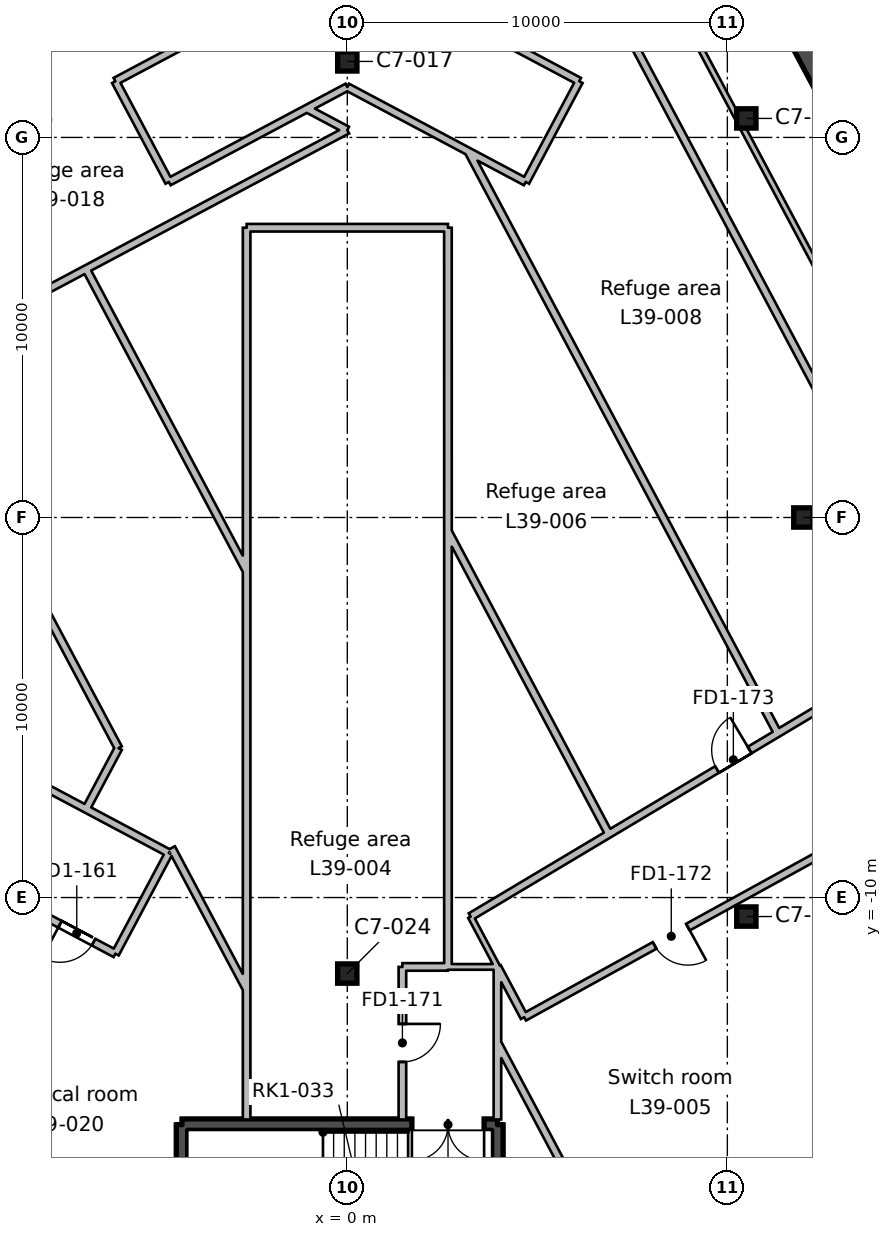
"""IFC4 building model, lengths in metres.
Left out: names, types, materials, properties, quantities, classifications, styles, units other than length and angle.
Written with IfcOpenShell. Run it as: python <this file> out.ifc"""

import sys

from ifc_helpers import new_model, si_unit, direction, frame, frame_2d, origin, origin_2d, place, context, subcontext, project, spatial, rectangle, hollow_rectangle, extrude, element, fill, save


model = new_model("IFC4")
c1 = context("Model", 3, precision=1e-05, world=origin(), true_north=direction((0.0, 1.0)))
c2 = subcontext(c1, "Body", "Model", "MODEL_VIEW")
j1 = project(units=[si_unit("LENGTHUNIT", "METRE"), si_unit("PLANEANGLEUNIT", "RADIAN")], contexts=[c1])
p1 = place(None, origin())
s1 = spatial("IfcSite", under=j1, at=p1, CompositionType="ELEMENT")
p2 = place(p1, origin())
s2 = spatial("IfcBuilding", under=s1, at=p2, CompositionType="ELEMENT")
p3 = place(p2, frame((0.0, 0.0, 183.6)))
s3 = spatial("IfcBuildingStorey", under=s2, at=p3, CompositionType="ELEMENT", Elevation=183.6)
for number, where, z_axis, x_axis in (
    (1, (0.0, -12.0, 0.0), (0.0, 0.0, 1.0), (1.0, 0.0, 0.0)),
    (2, (10.5, -10.5, 0.0), (0.0, 0.0, 1.0), (1.0, 0.0, 0.0)),
    (3, (12.0, 0.0, 0.0), (0.0, 0.0, 1.0), (1.0, 0.0, 0.0)),
    (4, (10.5, 10.5, 0.0), (0.0, 0.0, 1.0), (1.0, 0.0, 0.0)),
    (5, (0.0, 12.0, 0.0), (0.0, 0.0, 1.0), (1.0, 0.0, 0.0)),
):
    element("IfcColumn", number, at=place(p3, frame(where, z_axis=z_axis, x_axis=x_axis)), inside=s3, PredefinedType="COLUMN", context=c2, shape_type="SweptSolid", body=[
        extrude(hollow_rectangle(XDim=0.508, YDim=0.508, WallThickness=0.012, InnerFilletRadius=0.006, OuterFilletRadius=0.018, at=origin_2d()), origin(), (0.0, 0.0, 1.0), 6.0),
    ])
p4 = place(p3, frame((19.215, -0.939, 0.0), z_axis=(0.0, 0.0, 1.0), x_axis=(-0.469479580143, 0.882943329908, 0.0)))
e6 = element("IfcWall", 6, at=p4, inside=s3, PredefinedType="SHEAR", context=c2, shape_type="SweptSolid", body=[
    extrude(rectangle(XDim=19.7, YDim=0.75, at=frame_2d((9.85, 0.0))), origin(), (0.0, 0.0, 1.0), 6.0),
])
p5 = place(p4, frame((6.85, 0.0, 0.0)))
e7 = element("IfcOpeningElement", 7, at=p5, cuts=e6, PredefinedType="OPENING", context=c2, shape_type="SweptSolid", body=[
    extrude(rectangle(XDim=2.4, YDim=2.4, at=frame_2d((1.2, 1.2))), frame((0.0, 0.385, 0.0), z_axis=(0.0, -1.0, 0.0), x_axis=(1.0, 0.0, 0.0)), (0.0, 0.0, 1.0), 0.77),
])
for number, where, z_axis, x_axis in (
    (8, (3.95, -15.975, 0.0), (0.0, 0.0, 1.0), (0.0, -1.0, 0.0)),
    (9, (-4.35, -20.825, 0.0), (0.0, 0.0, 1.0), (0.0, 1.0, 0.0)),
):
    element("IfcWall", number, at=place(p3, frame(where, z_axis=z_axis, x_axis=x_axis)), inside=s3, PredefinedType="SHEAR", context=c2, shape_type="SweptSolid", body=[
        extrude(rectangle(XDim=4.85, YDim=0.3, at=frame_2d((2.425, 0.0))), origin(), (0.0, 0.0, 1.0), 6.0),
    ])
p6 = place(p3, frame((-4.35, -15.975, 0.0), z_axis=(0.0, 0.0, 1.0), x_axis=(1.0, 0.0, 0.0)))
e10 = element("IfcWall", 10, at=p6, inside=s3, PredefinedType="SHEAR", context=c2, shape_type="SweptSolid", body=[
    extrude(rectangle(XDim=8.3, YDim=0.3, at=frame_2d((4.15, 0.0))), origin(), (0.0, 0.0, 1.0), 6.0),
])
p7 = place(p6, frame((6.05, 0.0, 0.0)))
e11 = element("IfcOpeningElement", 11, at=p7, cuts=e10, PredefinedType="OPENING", context=c2, shape_type="SweptSolid", body=[
    extrude(rectangle(XDim=1.9, YDim=2.1, at=frame_2d((0.95, 1.05))), frame((0.0, 0.16, 0.0), z_axis=(0.0, -1.0, 0.0), x_axis=(1.0, 0.0, 0.0)), (0.0, 0.0, 1.0), 0.32),
])
p8 = place(p3, frame((-15.353, -0.97, 0.0), z_axis=(0.0, 0.0, 1.0), x_axis=(0.469461347352, 0.882953024426, 0.0)))
e12 = element("IfcWall", 12, at=p8, inside=s3, PredefinedType="PARTITIONING", context=c2, shape_type="SweptSolid", body=[
    extrude(rectangle(XDim=17.064, YDim=0.2, at=frame_2d((8.532, 0.0))), origin(), (0.0, 0.0, 1.0), 5.55),
])
p9 = place(p3, frame((-6.873, 6.538, 0.0), z_axis=(0.0, 0.0, 1.0), x_axis=(-0.882996997183, -0.469378634969, 0.0)))
e13 = element("IfcWall", 13, at=p9, inside=s3, PredefinedType="PARTITIONING", context=c2, shape_type="SweptSolid", body=[
    extrude(rectangle(XDim=5.167, YDim=0.2, at=frame_2d((2.583, 0.0))), origin(), (0.0, 0.0, 1.0), 5.55),
])
p10 = place(p3, frame((-11.435, 4.113, 0.0), z_axis=(0.0, 0.0, 1.0), x_axis=(0.469480251476, -0.882942972946, 0.0)))
e14 = element("IfcWall", 14, at=p10, inside=s3, PredefinedType="PARTITIONING", context=c2, shape_type="SweptSolid", body=[
    extrude(rectangle(XDim=11.532, YDim=0.2, at=frame_2d((5.766, 0.0))), origin(), (0.0, 0.0, 1.0), 5.55),
])
p11 = place(p3, frame((-6.021, -6.069, 0.0), z_axis=(0.0, 0.0, 1.0), x_axis=(-0.469624131111, -0.882866453932, 0.0)))
e15 = element("IfcWall", 15, at=p11, inside=s3, PredefinedType="PARTITIONING", context=c2, shape_type="SweptSolid", body=[
    extrude(rectangle(XDim=1.814, YDim=0.2, at=frame_2d((0.907, 0.0))), origin(), (0.0, 0.0, 1.0), 5.55),
])
p12 = place(p3, frame((-4.695, -8.829, 0.0), z_axis=(0.0, 0.0, 1.0), x_axis=(-0.469341661158, -0.883016650523, 0.0)))
e16 = element("IfcWall", 16, at=p12, inside=s3, PredefinedType="PARTITIONING", context=c2, shape_type="SweptSolid", body=[
    extrude(rectangle(XDim=3.0, YDim=0.2, at=frame_2d((1.5, 0.0))), origin(), (0.0, 0.0, 1.0), 5.55),
])
p13 = place(p3, frame((-6.103, -11.478, 0.0), z_axis=(0.0, 0.0, 1.0), x_axis=(-0.882995347911, 0.469381737574, 0.0)))
e17 = element("IfcWall", 17, at=p13, inside=s3, PredefinedType="PARTITIONING", context=c2, shape_type="SweptSolid", body=[
    extrude(rectangle(XDim=2.312, YDim=0.2, at=frame_2d((1.156, 0.0))), origin(), (0.0, 0.0, 1.0), 5.55),
])
p14 = place(p13, frame((0.65, 0.0, 0.0)))
e18 = element("IfcOpeningElement", 18, at=p14, cuts=e17, PredefinedType="OPENING", context=c2, shape_type="SweptSolid", body=[
    extrude(rectangle(XDim=1.0, YDim=2.1, at=frame_2d((0.5, 1.05))), frame((0.0, 0.11, 0.0), z_axis=(0.0, -1.0, 0.0), x_axis=(1.0, 0.0, 0.0)), (0.0, 0.0, 1.0), 0.22),
])
p15 = place(p3, frame((-1.063, 10.758, 0.0), z_axis=(0.0, 0.0, 1.0), x_axis=(0.883036930651, -0.469303504255, 0.0)))
e19 = element("IfcWall", 19, at=p15, inside=s3, PredefinedType="PARTITIONING", context=c2, shape_type="SweptSolid", body=[
    extrude(rectangle(XDim=1.204, YDim=0.2, at=frame_2d((0.602, 0.0))), origin(), (0.0, 0.0, 1.0), 5.55),
])
p16 = place(p3, frame((0.0, 10.193, 0.0), z_axis=(0.0, 0.0, 1.0), x_axis=(-0.882917481192, -0.469528190215, 0.0)))
e20 = element("IfcWall", 20, at=p16, inside=s3, PredefinedType="PARTITIONING", context=c2, shape_type="SweptSolid", body=[
    extrude(rectangle(XDim=7.784, YDim=0.2, at=frame_2d((3.892, 0.0))), origin(), (0.0, 0.0, 1.0), 5.55),
])
p17 = place(p3, frame((-2.649, -1.407, 0.0), z_axis=(0.0, 0.0, 1.0), x_axis=(-0.469441525693, 0.882963563209, 0.0)))
e21 = element("IfcWall", 21, at=p17, inside=s3, PredefinedType="PARTITIONING", context=c2, shape_type="SweptSolid", body=[
    extrude(rectangle(XDim=8.998, YDim=0.2, at=frame_2d((4.499, 0.0))), origin(), (0.0, 0.0, 1.0), 5.55),
])
p18 = place(p3, frame((-4.624, -8.697, 0.0), z_axis=(0.0, 0.0, 1.0), x_axis=(0.469425311491, -0.882972183555, 0.0)))
e22 = element("IfcWall", 22, at=p18, inside=s3, PredefinedType="PARTITIONING", context=c2, shape_type="SweptSolid", body=[
    extrude(rectangle(XDim=4.208, YDim=0.2, at=frame_2d((2.104, 0.0))), origin(), (0.0, 0.0, 1.0), 5.55),
])
p19 = place(p3, frame((-20.588, -0.379, 0.0), z_axis=(0.0, 0.0, 1.0), x_axis=(0.882951465933, -0.469464278521, 0.0)))
e23 = element("IfcWall", 23, at=p19, inside=s3, PredefinedType="PARTITIONING", context=c2, shape_type="SweptSolid", body=[
    extrude(rectangle(XDim=18.0, YDim=0.2, at=frame_2d((9.0, 0.0))), origin(), (0.0, 0.0, 1.0), 5.55),
])
p20 = place(p19, frame((8.45, 0.0, 0.0)))
e24 = element("IfcOpeningElement", 24, at=p20, cuts=e23, PredefinedType="OPENING", context=c2, shape_type="SweptSolid", body=[
    extrude(rectangle(XDim=1.0, YDim=2.1, at=frame_2d((0.5, 1.05))), frame((0.0, 0.11, 0.0), z_axis=(0.0, -1.0, 0.0), x_axis=(1.0, 0.0, 0.0)), (0.0, 0.0, 1.0), 0.22),
])
p21 = place(p3, frame((-1.075, 10.754, 0.0), z_axis=(0.0, 0.0, 1.0), x_axis=(-0.88295221972, -0.469462860822, 0.0)))
e25 = element("IfcWall", 25, at=p21, inside=s3, PredefinedType="PARTITIONING", context=c2, shape_type="SweptSolid", body=[
    extrude(rectangle(XDim=4.1, YDim=0.2, at=frame_2d((2.05, 0.0))), origin(), (0.0, 0.0, 1.0), 5.55),
])
p22 = place(p3, frame((-4.695, 8.829, 0.0), z_axis=(0.0, 0.0, 1.0), x_axis=(-0.469341661158, 0.883016650523, 0.0)))
e26 = element("IfcWall", 26, at=p22, inside=s3, PredefinedType="PARTITIONING", context=c2, shape_type="SweptSolid", body=[
    extrude(rectangle(XDim=3.0, YDim=0.2, at=frame_2d((1.5, 0.0))), origin(), (0.0, 0.0, 1.0), 5.55),
])
p23 = place(p3, frame((-6.103, 11.478, 0.0), z_axis=(0.0, 0.0, 1.0), x_axis=(0.882813423711, 0.469723811314, 0.0)))
e27 = element("IfcWall", 27, at=p23, inside=s3, PredefinedType="PARTITIONING", context=c2, shape_type="SweptSolid", body=[
    extrude(rectangle(XDim=2.082, YDim=0.2, at=frame_2d((1.041, 0.0))), origin(), (0.0, 0.0, 1.0), 5.55),
])
p24 = place(p3, frame((2.649, -0.297, 0.0), z_axis=(0.0, 0.0, 1.0), x_axis=(-0.000123285559, 0.9999999924, 0.0)))
e28 = element("IfcWall", 28, at=p24, inside=s3, PredefinedType="PARTITIONING", context=c2, shape_type="SweptSolid", body=[
    extrude(rectangle(XDim=7.921, YDim=0.2, at=frame_2d((3.96, 0.0))), origin(), (0.0, 0.0, 1.0), 5.55),
])
p25 = place(p3, frame((-2.649, 7.624, 0.0), z_axis=(0.0, 0.0, 1.0), x_axis=(0.0, -1.0, 0.0)))
e29 = element("IfcWall", 29, at=p25, inside=s3, PredefinedType="PARTITIONING", context=c2, shape_type="SweptSolid", body=[
    extrude(rectangle(XDim=8.921, YDim=0.2, at=frame_2d((4.46, 0.0))), origin(), (0.0, 0.0, 1.0), 5.55),
])
p26 = place(p3, frame((-2.649, 7.624, 0.0), z_axis=(0.0, 0.0, 1.0), x_axis=(1.0, 0.0, 0.0)))
e30 = element("IfcWall", 30, at=p26, inside=s3, PredefinedType="PARTITIONING", context=c2, shape_type="SweptSolid", body=[
    extrude(rectangle(XDim=5.298, YDim=0.2, at=frame_2d((2.649, 0.0))), origin(), (0.0, 0.0, 1.0), 5.55),
])
p27 = place(p3, frame((-2.649, -15.84, 0.0), z_axis=(0.0, 0.0, 1.0), x_axis=(0.0, 1.0, 0.0)))
e31 = element("IfcWall", 31, at=p27, inside=s3, PredefinedType="PARTITIONING", context=c2, shape_type="SweptSolid", body=[
    extrude(rectangle(XDim=14.543, YDim=0.2, at=frame_2d((7.271, 0.0))), origin(), (0.0, 0.0, 1.0), 5.55),
])
p28 = place(p3, frame((3.186, 9.632, 0.0), z_axis=(0.0, 0.0, 1.0), x_axis=(-0.882970255793, 0.469428937524, 0.0)))
e32 = element("IfcWall", 32, at=p28, inside=s3, PredefinedType="PARTITIONING", context=c2, shape_type="SweptSolid", body=[
    extrude(rectangle(XDim=3.608, YDim=0.2, at=frame_2d((1.804, 0.0))), origin(), (0.0, 0.0, 1.0), 5.55),
])
p29 = place(p3, frame((0.0, 11.326, 0.0), z_axis=(0.0, 0.0, 1.0), x_axis=(-0.882791016648, -0.469765921418, 0.0)))
e33 = element("IfcWall", 33, at=p29, inside=s3, PredefinedType="PARTITIONING", context=c2, shape_type="SweptSolid", body=[
    extrude(rectangle(XDim=1.218, YDim=0.2, at=frame_2d((0.609, 0.0))), origin(), (0.0, 0.0, 1.0), 5.55),
])
p30 = place(p3, frame((3.184, 9.632, 0.0), z_axis=(0.0, 0.0, 1.0), x_axis=(0.469488044355, -0.882938829256, 0.0)))
e34 = element("IfcWall", 34, at=p30, inside=s3, PredefinedType="PARTITIONING", context=c2, shape_type="SweptSolid", body=[
    extrude(rectangle(XDim=17.34, YDim=0.2, at=frame_2d((8.67, 0.0))), origin(), (0.0, 0.0, 1.0), 5.55),
])
p31 = place(p3, frame((6.883, -8.329, 0.0), z_axis=(0.0, 0.0, 1.0), x_axis=(-0.469431608927, 0.882968835543, 0.0)))
e35 = element("IfcWall", 35, at=p31, inside=s3, PredefinedType="PARTITIONING", context=c2, shape_type="SweptSolid", body=[
    extrude(rectangle(XDim=9.02, YDim=0.2, at=frame_2d((4.51, 0.0))), origin(), (0.0, 0.0, 1.0), 5.55),
])
p32 = place(p3, frame((1.45, -15.84, 0.0), z_axis=(0.0, 0.0, 1.0), x_axis=(0.0, 1.0, 0.0)))
e36 = element("IfcWall", 36, at=p32, inside=s3, PredefinedType="PARTITIONING", context=c2, shape_type="SweptSolid", body=[
    extrude(rectangle(XDim=4.015, YDim=0.2, at=frame_2d((2.008, 0.0))), origin(), (0.0, 0.0, 1.0), 5.55),
])
p33 = place(p32, frame((1.515, 0.0, 0.0)))
e37 = element("IfcOpeningElement", 37, at=p33, cuts=e36, PredefinedType="OPENING", context=c2, shape_type="SweptSolid", body=[
    extrude(rectangle(XDim=1.0, YDim=2.1, at=frame_2d((0.5, 1.05))), frame((0.0, 0.11, 0.0), z_axis=(0.0, -1.0, 0.0), x_axis=(1.0, 0.0, 0.0)), (0.0, 0.0, 1.0), 0.22),
])
p34 = place(p3, frame((2.647, -11.825, 0.0), z_axis=(0.0, 0.0, 1.0), x_axis=(-0.999999667213, -0.000815826773, 0.0)))
e38 = element("IfcWall", 38, at=p34, inside=s3, PredefinedType="PARTITIONING", context=c2, shape_type="SweptSolid", body=[
    extrude(rectangle(XDim=1.197, YDim=0.2, at=frame_2d((0.599, 0.0))), origin(), (0.0, 0.0, 1.0), 5.55),
])
p35 = place(p3, frame((2.647, -11.825, 0.0), z_axis=(0.0, 0.0, 1.0), x_axis=(1.0, 0.0, 0.0)))
e39 = element("IfcWall", 39, at=p35, inside=s3, PredefinedType="PARTITIONING", context=c2, shape_type="SweptSolid", body=[
    extrude(rectangle(XDim=1.303, YDim=0.15, at=frame_2d((0.651, 0.0))), origin(), (0.0, 0.0, 1.0), 5.55),
])
p36 = place(p3, frame((3.95, -11.825, 0.0), z_axis=(0.0, 0.0, 1.0), x_axis=(0.0, -1.0, 0.0)))
e40 = element("IfcWall", 40, at=p36, inside=s3, PredefinedType="PARTITIONING", context=c2, shape_type="SweptSolid", body=[
    extrude(rectangle(XDim=4.015, YDim=0.2, at=frame_2d((2.008, 0.0))), origin(), (0.0, 0.0, 1.0), 5.55),
])
p37 = place(p3, frame((2.649, -0.297, 0.0), z_axis=(0.0, 0.0, 1.0), x_axis=(0.0, -1.0, 0.0)))
e41 = element("IfcWall", 41, at=p37, inside=s3, PredefinedType="PARTITIONING", context=c2, shape_type="SweptSolid", body=[
    extrude(rectangle(XDim=11.528, YDim=0.2, at=frame_2d((5.764, 0.0))), origin(), (0.0, 0.0, 1.0), 5.55),
])
p38 = place(p3, frame((6.812, 13.814, 0.0), z_axis=(0.0, 0.0, 1.0), x_axis=(0.46951956429, -0.882922068333, 0.0)))
e42 = element("IfcWall", 42, at=p38, inside=s3, PredefinedType="PARTITIONING", context=c2, shape_type="SweptSolid", body=[
    extrude(rectangle(XDim=19.073, YDim=0.2, at=frame_2d((9.536, 0.0))), origin(), (0.0, 0.0, 1.0), 5.55),
])
p39 = place(p3, frame((3.206, 13.019, 0.0), z_axis=(0.0, 0.0, 1.0), x_axis=(0.882863200263, -0.469630247772, 0.0)))
e43 = element("IfcWall", 43, at=p39, inside=s3, PredefinedType="PARTITIONING", context=c2, shape_type="SweptSolid", body=[
    extrude(rectangle(XDim=3.281, YDim=0.2, at=frame_2d((1.641, 0.0))), origin(), (0.0, 0.0, 1.0), 5.55),
])
p40 = place(p3, frame((6.103, 11.478, 0.0), z_axis=(0.0, 0.0, 1.0), x_axis=(-0.469341661158, -0.883016650523, 0.0)))
e44 = element("IfcWall", 44, at=p40, inside=s3, PredefinedType="PARTITIONING", context=c2, shape_type="SweptSolid", body=[
    extrude(rectangle(XDim=3.0, YDim=0.2, at=frame_2d((1.5, 0.0))), origin(), (0.0, 0.0, 1.0), 5.55),
])
p41 = place(p3, frame((4.695, 8.829, 0.0), z_axis=(0.0, 0.0, 1.0), x_axis=(-0.882799303078, 0.469750349106, 0.0)))
e45 = element("IfcWall", 45, at=p41, inside=s3, PredefinedType="PARTITIONING", context=c2, shape_type="SweptSolid", body=[
    extrude(rectangle(XDim=1.709, YDim=0.2, at=frame_2d((0.855, 0.0))), origin(), (0.0, 0.0, 1.0), 5.55),
])
p42 = place(p3, frame((3.951, -11.827, 0.0), z_axis=(0.0, 0.0, 1.0), x_axis=(-0.469381070395, 0.882995702569, 0.0)))
e46 = element("IfcWall", 46, at=p42, inside=s3, PredefinedType="PARTITIONING", context=c2, shape_type="SweptSolid", body=[
    extrude(rectangle(XDim=1.502, YDim=0.15, at=frame_2d((0.751, 0.0))), origin(), (0.0, 0.0, 1.0), 5.55),
])
p43 = place(p3, frame((3.246, -10.501, 0.0), z_axis=(0.0, 0.0, 1.0), x_axis=(0.858642651925, 0.512574673872, 0.0)))
e47 = element("IfcWall", 47, at=p43, inside=s3, PredefinedType="PARTITIONING", context=c2, shape_type="SweptSolid", body=[
    extrude(rectangle(XDim=16.083, YDim=0.2, at=frame_2d((8.042, 0.0))), origin(), (0.0, 0.0, 1.0), 5.55),
])
p44 = place(p43, frame((7.55, 0.0, 0.0)))
e48 = element("IfcOpeningElement", 48, at=p44, cuts=e47, PredefinedType="OPENING", context=c2, shape_type="SweptSolid", body=[
    extrude(rectangle(XDim=1.0, YDim=2.1, at=frame_2d((0.5, 1.05))), frame((0.0, 0.11, 0.0), z_axis=(0.0, -1.0, 0.0), x_axis=(1.0, 0.0, 0.0)), (0.0, 0.0, 1.0), 0.22),
])
p45 = place(p3, frame((17.056, -2.257, 0.0), z_axis=(0.0, 0.0, 1.0), x_axis=(-0.469446756585, 0.882960782103, 0.0)))
e49 = element("IfcWall", 49, at=p45, inside=s3, PredefinedType="PARTITIONING", context=c2, shape_type="SweptSolid", body=[
    extrude(rectangle(XDim=20.0, YDim=0.15, at=frame_2d((10.0, 0.0))), origin(), (0.0, 0.0, 1.0), 5.55),
])
p46 = place(p3, frame((7.304, -20.127, 0.0), z_axis=(0.0, 0.0, 1.0), x_axis=(-0.469420857785, 0.882974551319, 0.0)))
e50 = element("IfcWall", 50, at=p46, inside=s3, PredefinedType="PARTITIONING", context=c2, shape_type="SweptSolid", body=[
    extrude(rectangle(XDim=7.145, YDim=0.2, at=frame_2d((3.573, 0.0))), origin(), (0.0, 0.0, 1.0), 5.55),
])
p47 = place(p3, frame((12.424, -8.873, 0.0), z_axis=(0.0, 0.0, 1.0), x_axis=(-0.876103131237, -0.482123742867, 0.0)))
e51 = element("IfcWall", 51, at=p47, inside=s3, PredefinedType="PARTITIONING", context=c2, shape_type="SweptSolid", body=[
    extrude(rectangle(XDim=8.869, YDim=0.2, at=frame_2d((4.435, 0.0))), origin(), (0.0, 0.0, 1.0), 5.55),
])
p48 = place(p47, frame((3.951, 0.0, 0.0)))
e52 = element("IfcOpeningElement", 52, at=p48, cuts=e51, PredefinedType="OPENING", context=c2, shape_type="SweptSolid", body=[
    extrude(rectangle(XDim=1.0, YDim=2.1, at=frame_2d((0.5, 1.05))), frame((0.0, 0.11, 0.0), z_axis=(0.0, -1.0, 0.0), x_axis=(1.0, 0.0, 0.0)), (0.0, 0.0, 1.0), 0.22),
])
p49 = place(p3, frame((3.951, -11.827, 0.0), z_axis=(0.0, 0.0, 1.0), x_axis=(0.470080557323, -0.882623515224, 0.0)))
e53 = element("IfcWall", 53, at=p49, inside=s3, PredefinedType="PARTITIONING", context=c2, shape_type="SweptSolid", body=[
    extrude(rectangle(XDim=1.498, YDim=0.2, at=frame_2d((0.749, 0.0))), origin(), (0.0, 0.0, 1.0), 5.55),
])
p50 = place(p7, frame((1.9, 0.0, 0.0), z_axis=(0.0, 0.0, 1.0), x_axis=(-1.0, 0.0, 0.0)))
e54 = element("IfcDoor", 54, at=p50, inside=s3, OperationType="DOUBLE_DOOR_SINGLE_SWING", PredefinedType="DOOR", context=c2, shape_type="SweptSolid", body=[
    extrude(rectangle(XDim=1.9, YDim=2.1, at=frame_2d((0.95, 1.05))), frame((0.0, 0.025, 0.0), z_axis=(0.0, -1.0, 0.0), x_axis=(1.0, 0.0, 0.0)), (0.0, 0.0, 1.0), 0.05),
])
fill(e11, e54)
p51 = place(p33, frame((1.0, 0.0, 0.0), z_axis=(0.0, 0.0, 1.0), x_axis=(-1.0, 0.0, 0.0)))
e55 = element("IfcDoor", 55, at=p51, inside=s3, OperationType="SINGLE_SWING_LEFT", PredefinedType="DOOR", context=c2, shape_type="SweptSolid", body=[
    extrude(rectangle(XDim=1.0, YDim=2.1, at=frame_2d((0.5, 1.05))), frame((0.0, 0.025, 0.0), z_axis=(0.0, -1.0, 0.0), x_axis=(1.0, 0.0, 0.0)), (0.0, 0.0, 1.0), 0.05),
])
fill(e37, e55)
p52 = place(p48, origin())
e56 = element("IfcDoor", 56, at=p52, inside=s3, OperationType="SINGLE_SWING_LEFT", PredefinedType="DOOR", context=c2, shape_type="SweptSolid", body=[
    extrude(rectangle(XDim=1.0, YDim=2.1, at=frame_2d((0.5, 1.05))), frame((0.0, 0.025, 0.0), z_axis=(0.0, -1.0, 0.0), x_axis=(1.0, 0.0, 0.0)), (0.0, 0.0, 1.0), 0.05),
])
fill(e52, e56)
p53 = place(p44, origin())
e57 = element("IfcDoor", 57, at=p53, inside=s3, OperationType="SINGLE_SWING_RIGHT", PredefinedType="DOOR", context=c2, shape_type="SweptSolid", body=[
    extrude(rectangle(XDim=1.0, YDim=2.1, at=frame_2d((0.5, 1.05))), frame((0.0, 0.025, 0.0), z_axis=(0.0, -1.0, 0.0), x_axis=(1.0, 0.0, 0.0)), (0.0, 0.0, 1.0), 0.05),
])
fill(e48, e57)
p54 = place(p14, origin())
e58 = element("IfcDoor", 58, at=p54, inside=s3, OperationType="SINGLE_SWING_RIGHT", PredefinedType="DOOR", context=c2, shape_type="SweptSolid", body=[
    extrude(rectangle(XDim=1.0, YDim=2.1, at=frame_2d((0.5, 1.05))), frame((0.0, 0.025, 0.0), z_axis=(0.0, -1.0, 0.0), x_axis=(1.0, 0.0, 0.0)), (0.0, 0.0, 1.0), 0.05),
])
fill(e18, e58)
save(model, sys.argv[1])
